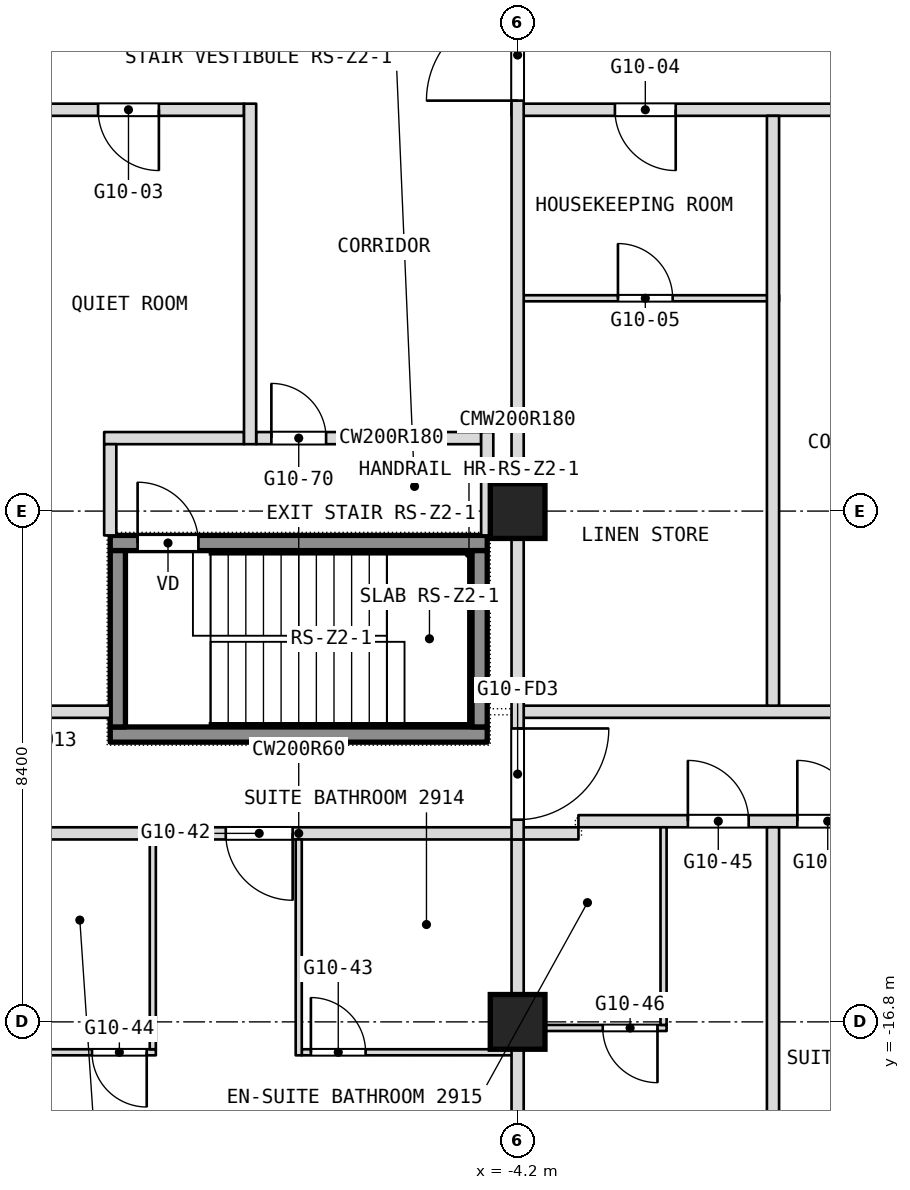
"""IFC4 building model, lengths in metres.
Left out: names, types, materials, properties, quantities, classifications, styles, units other than length and angle.
Written with IfcOpenShell. Run it as: python <this file> out.ifc"""

import sys

from ifc_helpers import new_model, si_unit, direction, frame, frame_2d, origin, origin_2d, place, context, subcontext, project, spatial, rectangle, extrude, element, fill, save


model = new_model("IFC4")
c1 = context("Model", 3, precision=1e-05, world=origin(), true_north=direction((0.0, 1.0)))
c2 = subcontext(c1, "Body", "Model", "MODEL_VIEW")
j1 = project(units=[si_unit("LENGTHUNIT", "METRE"), si_unit("PLANEANGLEUNIT", "RADIAN")], contexts=[c1])
p1 = place(None, origin())
s1 = spatial("IfcSite", under=j1, at=p1, CompositionType="ELEMENT")
p2 = place(p1, origin())
s2 = spatial("IfcBuilding", under=s1, at=p2, CompositionType="ELEMENT")
p3 = place(p2, frame((0.0, 0.0, 130.1)))
s3 = spatial("IfcBuildingStorey", under=s2, at=p3, CompositionType="ELEMENT", Elevation=130.1)
for number, where, z_axis, x_axis in (
    (1, (-4.2, -16.8, 0.0), (0.0, 0.0, 1.0), (1.0, 0.0, 0.0)),
    (2, (-4.2, -8.4, 0.0), (0.0, 0.0, 1.0), (1.0, 0.0, 0.0)),
):
    element("IfcColumn", number, at=place(p3, frame(where, z_axis=z_axis, x_axis=x_axis)), inside=s3, PredefinedType="COLUMN", context=c2, shape_type="SweptSolid", body=[
        extrude(rectangle(XDim=0.9, YDim=0.9, at=origin_2d()), origin(), (0.0, 0.0, 1.0), 3.6),
    ])
p4 = place(p3, frame((-12.5, -17.3, 0.0), z_axis=(0.0, 0.0, 1.0), x_axis=(1.0, 0.0, 0.0)))
e3 = element("IfcWall", 3, at=p4, inside=s3, PredefinedType="PARTITIONING", context=c2, shape_type="SweptSolid", body=[
    extrude(rectangle(XDim=2.35, YDim=0.1, at=frame_2d((1.175, 0.0))), origin(), (0.0, 0.0, 1.0), 3.34),
])
p5 = place(p4, frame((1.3, 0.0, 0.0)))
e4 = element("IfcOpeningElement", 4, at=p5, cuts=e3, PredefinedType="OPENING", context=c2, shape_type="SweptSolid", body=[
    extrude(rectangle(XDim=0.9, YDim=2.1, at=frame_2d((0.45, 1.05))), frame((0.0, 0.05, 0.0), z_axis=(0.0, -1.0, 0.0), x_axis=(1.0, 0.0, 0.0)), (0.0, 0.0, 1.0), 0.1),
])
p6 = place(p3, frame((-7.75, -17.3, 0.0), z_axis=(0.0, 0.0, 1.0), x_axis=(1.0, 0.0, 0.0)))
e5 = element("IfcWall", 5, at=p6, inside=s3, PredefinedType="PARTITIONING", context=c2, shape_type="SweptSolid", body=[
    extrude(rectangle(XDim=3.65, YDim=0.1, at=frame_2d((1.825, 0.0))), origin(), (0.0, 0.0, 1.0), 3.34),
])
p7 = place(p6, frame((0.15, 0.0, 0.0)))
e6 = element("IfcOpeningElement", 6, at=p7, cuts=e5, PredefinedType="OPENING", context=c2, shape_type="SweptSolid", body=[
    extrude(rectangle(XDim=0.9, YDim=2.1, at=frame_2d((0.45, 1.05))), frame((0.0, 0.05, 0.0), z_axis=(0.0, -1.0, 0.0), x_axis=(1.0, 0.0, 0.0)), (0.0, 0.0, 1.0), 0.1),
])
p8 = place(p3, frame((-4.1, -16.9, 0.0), z_axis=(0.0, 0.0, 1.0), x_axis=(1.0, 0.0, 0.0)))
e7 = element("IfcWall", 7, at=p8, inside=s3, PredefinedType="PARTITIONING", context=c2, shape_type="SweptSolid", body=[
    extrude(rectangle(XDim=2.35, YDim=0.1, at=frame_2d((1.175, 0.0))), origin(), (0.0, 0.0, 1.0), 2.89),
])
p9 = place(p8, frame((1.3, 0.0, 0.0)))
e8 = element("IfcOpeningElement", 8, at=p9, cuts=e7, PredefinedType="OPENING", context=c2, shape_type="SweptSolid", body=[
    extrude(rectangle(XDim=0.9, YDim=2.1, at=frame_2d((0.45, 1.05))), frame((0.0, 0.05, 0.0), z_axis=(0.0, -1.0, 0.0), x_axis=(1.0, 0.0, 0.0)), (0.0, 0.0, 1.0), 0.1),
])
p10 = place(p3, frame((-12.4, -13.7, 0.0), z_axis=(0.0, 0.0, 1.0), x_axis=(1.0, 0.0, 0.0)))
e9 = element("IfcWall", 9, at=p10, inside=s3, PredefinedType="PARTITIONING", context=c2, shape_type="SweptSolid", body=[
    extrude(rectangle(XDim=9.2, YDim=0.2, at=frame_2d((4.6, 0.0))), origin(), (0.0, 0.0, 1.0), 3.34),
])
p11 = place(p10, frame((3.4, 0.0, 0.0)))
e10 = element("IfcOpeningElement", 10, at=p11, cuts=e9, PredefinedType="OPENING", context=c2, shape_type="SweptSolid", body=[
    extrude(rectangle(XDim=1.1, YDim=2.1, at=frame_2d((0.55, 1.05))), frame((0.0, 0.1, 0.0), z_axis=(0.0, -1.0, 0.0), x_axis=(1.0, 0.0, 0.0)), (0.0, 0.0, 1.0), 0.2),
])
p12 = place(p3, frame((-3.2, -13.5, 0.0), z_axis=(0.0, 0.0, 1.0), x_axis=(1.0, 0.0, 0.0)))
e11 = element("IfcWall", 11, at=p12, inside=s3, PredefinedType="PARTITIONING", context=c2, shape_type="SweptSolid", body=[
    extrude(rectangle(XDim=19.9, YDim=0.2, at=frame_2d((9.95, 0.0))), origin(), (0.0, 0.0, 1.0), 3.34),
])
p13 = place(p12, frame((1.8, 0.0, 0.0)))
e12 = element("IfcOpeningElement", 12, at=p13, cuts=e11, PredefinedType="OPENING", context=c2, shape_type="SweptSolid", body=[
    extrude(rectangle(XDim=1.0, YDim=2.1, at=frame_2d((0.5, 1.05))), frame((0.0, 0.1, 0.0), z_axis=(0.0, -1.0, 0.0), x_axis=(1.0, 0.0, 0.0)), (0.0, 0.0, 1.0), 0.2),
])
p14 = place(p12, frame((3.6, 0.0, 0.0)))
e13 = element("IfcOpeningElement", 13, at=p14, cuts=e11, PredefinedType="OPENING", context=c2, shape_type="SweptSolid", body=[
    extrude(rectangle(XDim=1.0, YDim=2.1, at=frame_2d((0.5, 1.05))), frame((0.0, 0.1, 0.0), z_axis=(0.0, -1.0, 0.0), x_axis=(1.0, 0.0, 0.0)), (0.0, 0.0, 1.0), 0.2),
])
p15 = place(p12, frame((11.0, 0.0, 0.0)))
e14 = element("IfcOpeningElement", 14, at=p15, cuts=e11, PredefinedType="OPENING", context=c2, shape_type="SweptSolid", body=[
    extrude(rectangle(XDim=1.1, YDim=2.1, at=frame_2d((0.55, 1.05))), frame((0.0, 0.1, 0.0), z_axis=(0.0, -1.0, 0.0), x_axis=(1.0, 0.0, 0.0)), (0.0, 0.0, 1.0), 0.2),
])
p16 = place(p12, frame((18.6, 0.0, 0.0)))
e15 = element("IfcOpeningElement", 15, at=p16, cuts=e11, PredefinedType="OPENING", context=c2, shape_type="SweptSolid", body=[
    extrude(rectangle(XDim=1.0, YDim=2.1, at=frame_2d((0.5, 1.05))), frame((0.0, 0.1, 0.0), z_axis=(0.0, -1.0, 0.0), x_axis=(1.0, 0.0, 0.0)), (0.0, 0.0, 1.0), 0.2),
])
p17 = place(p3, frame((-16.7, -11.7, 0.0), z_axis=(0.0, 0.0, 1.0), x_axis=(1.0, 0.0, 0.0)))
e16 = element("IfcWall", 16, at=p17, inside=s3, PredefinedType="PARTITIONING", context=c2, shape_type="SweptSolid", body=[
    extrude(rectangle(XDim=5.8, YDim=0.2, at=frame_2d((2.9, 0.0))), origin(), (0.0, 0.0, 1.0), 3.34),
])
p18 = place(p3, frame((-4.1, -11.7, 0.0), z_axis=(0.0, 0.0, 1.0), x_axis=(1.0, 0.0, 0.0)))
e17 = element("IfcWall", 17, at=p18, inside=s3, PredefinedType="PARTITIONING", context=c2, shape_type="SweptSolid", body=[
    extrude(rectangle(XDim=20.8, YDim=0.2, at=frame_2d((10.4, 0.0))), origin(), (0.0, 0.0, 1.0), 3.34),
])
p19 = place(p18, frame((14.1, 0.0, 0.0)))
e18 = element("IfcOpeningElement", 18, at=p19, cuts=e17, PredefinedType="OPENING", context=c2, shape_type="SweptSolid", body=[
    extrude(rectangle(XDim=1.0, YDim=2.1, at=frame_2d((0.5, 1.05))), frame((0.0, 0.1, 0.0), z_axis=(0.0, -1.0, 0.0), x_axis=(1.0, 0.0, 0.0)), (0.0, 0.0, 1.0), 0.2),
])
p20 = place(p3, frame((-11.0, -7.2, 0.0), z_axis=(0.0, 0.0, 1.0), x_axis=(1.0, 0.0, 0.0)))
e19 = element("IfcWall", 19, at=p20, inside=s3, PredefinedType="PARTITIONING", context=c2, shape_type="SweptSolid", body=[
    extrude(rectangle(XDim=2.3, YDim=0.2, at=frame_2d((1.15, 0.0))), origin(), (0.0, 0.0, 1.0), 3.34),
])
p21 = place(p3, frame((-8.5, -7.2, 0.0), z_axis=(0.0, 0.0, 1.0), x_axis=(1.0, 0.0, 0.0)))
e20 = element("IfcWall", 20, at=p21, inside=s3, PredefinedType="PARTITIONING", context=c2, shape_type="SweptSolid", body=[
    extrude(rectangle(XDim=3.7, YDim=0.2, at=frame_2d((1.85, 0.0))), origin(), (0.0, 0.0, 1.0), 3.34),
])
p22 = place(p21, frame((0.25, 0.0, 0.0)))
e21 = element("IfcOpeningElement", 21, at=p22, cuts=e20, PredefinedType="OPENING", context=c2, shape_type="SweptSolid", body=[
    extrude(rectangle(XDim=0.9, YDim=2.1, at=frame_2d((0.45, 1.05))), frame((0.0, 0.1, 0.0), z_axis=(0.0, -1.0, 0.0), x_axis=(1.0, 0.0, 0.0)), (0.0, 0.0, 1.0), 0.2),
])
p23 = place(p3, frame((-4.1, -4.9, 0.0), z_axis=(0.0, 0.0, 1.0), x_axis=(1.0, 0.0, 0.0)))
e22 = element("IfcWall", 22, at=p23, inside=s3, PredefinedType="PARTITIONING", context=c2, shape_type="SweptSolid", body=[
    extrude(rectangle(XDim=4.2, YDim=0.1, at=frame_2d((2.1, 0.0))), origin(), (0.0, 0.0, 1.0), 3.34),
])
p24 = place(p23, frame((1.55, 0.0, 0.0)))
e23 = element("IfcOpeningElement", 23, at=p24, cuts=e22, PredefinedType="OPENING", context=c2, shape_type="SweptSolid", body=[
    extrude(rectangle(XDim=0.9, YDim=2.1, at=frame_2d((0.45, 1.05))), frame((0.0, 0.05, 0.0), z_axis=(0.0, -1.0, 0.0), x_axis=(1.0, 0.0, 0.0)), (0.0, 0.0, 1.0), 0.1),
])
p25 = place(p3, frame((-16.9, -1.8, 0.0), z_axis=(0.0, 0.0, 1.0), x_axis=(1.0, 0.0, 0.0)))
e24 = element("IfcWall", 24, at=p25, inside=s3, PredefinedType="PARTITIONING", context=c2, shape_type="SweptSolid", body=[
    extrude(rectangle(XDim=8.2, YDim=0.2, at=frame_2d((4.1, 0.0))), origin(), (0.0, 0.0, 1.0), 3.34),
])
p26 = place(p25, frame((1.7, 0.0, 0.0)))
e25 = element("IfcOpeningElement", 25, at=p26, cuts=e24, PredefinedType="OPENING", context=c2, shape_type="SweptSolid", body=[
    extrude(rectangle(XDim=1.0, YDim=2.1, at=frame_2d((0.5, 1.05))), frame((0.0, 0.1, 0.0), z_axis=(0.0, -1.0, 0.0), x_axis=(1.0, 0.0, 0.0)), (0.0, 0.0, 1.0), 0.2),
])
p27 = place(p25, frame((5.8, 0.0, 0.0)))
e26 = element("IfcOpeningElement", 26, at=p27, cuts=e24, PredefinedType="OPENING", context=c2, shape_type="SweptSolid", body=[
    extrude(rectangle(XDim=1.0, YDim=2.1, at=frame_2d((0.5, 1.05))), frame((0.0, 0.1, 0.0), z_axis=(0.0, -1.0, 0.0), x_axis=(1.0, 0.0, 0.0)), (0.0, 0.0, 1.0), 0.2),
])
p28 = place(p3, frame((-4.3, -1.8, 0.0), z_axis=(0.0, 0.0, 1.0), x_axis=(1.0, 0.0, 0.0)))
e27 = element("IfcWall", 27, at=p28, inside=s3, PredefinedType="PARTITIONING", context=c2, shape_type="SweptSolid", body=[
    extrude(rectangle(XDim=11.3, YDim=0.2, at=frame_2d((5.65, 0.0))), origin(), (0.0, 0.0, 1.0), 3.34),
])
p29 = place(p28, frame((1.7, 0.0, 0.0)))
e28 = element("IfcOpeningElement", 28, at=p29, cuts=e27, PredefinedType="OPENING", context=c2, shape_type="SweptSolid", body=[
    extrude(rectangle(XDim=1.0, YDim=2.1, at=frame_2d((0.5, 1.05))), frame((0.0, 0.1, 0.0), z_axis=(0.0, -1.0, 0.0), x_axis=(1.0, 0.0, 0.0)), (0.0, 0.0, 1.0), 0.2),
])
p30 = place(p28, frame((5.9, 0.0, 0.0)))
e29 = element("IfcOpeningElement", 29, at=p30, cuts=e27, PredefinedType="OPENING", context=c2, shape_type="SweptSolid", body=[
    extrude(rectangle(XDim=1.0, YDim=2.1, at=frame_2d((0.5, 1.05))), frame((0.0, 0.1, 0.0), z_axis=(0.0, -1.0, 0.0), x_axis=(1.0, 0.0, 0.0)), (0.0, 0.0, 1.0), 0.2),
])
p31 = place(p28, frame((10.1, 0.0, 0.0)))
e30 = element("IfcOpeningElement", 30, at=p31, cuts=e27, PredefinedType="OPENING", context=c2, shape_type="SweptSolid", body=[
    extrude(rectangle(XDim=1.0, YDim=2.1, at=frame_2d((0.5, 1.05))), frame((0.0, 0.1, 0.0), z_axis=(0.0, -1.0, 0.0), x_axis=(1.0, 0.0, 0.0)), (0.0, 0.0, 1.0), 0.2),
])
p32 = place(p3, frame((0.0, -23.3, 0.0), z_axis=(0.0, 0.0, 1.0), x_axis=(0.0, 1.0, 0.0)))
e31 = element("IfcWall", 31, at=p32, inside=s3, PredefinedType="PARTITIONING", context=c2, shape_type="SweptSolid", body=[
    extrude(rectangle(XDim=9.7, YDim=0.2, at=frame_2d((4.85, 0.0))), origin(), (0.0, 0.0, 1.0), 3.34),
])
p33 = place(p3, frame((0.0, -11.6, 0.0), z_axis=(0.0, 0.0, 1.0), x_axis=(0.0, 1.0, 0.0)))
e32 = element("IfcWall", 32, at=p33, inside=s3, PredefinedType="PARTITIONING", context=c2, shape_type="SweptSolid", body=[
    extrude(rectangle(XDim=9.7, YDim=0.2, at=frame_2d((4.85, 0.0))), origin(), (0.0, 0.0, 1.0), 3.34),
])
p34 = place(p3, frame((-1.8, -16.85, 0.0), z_axis=(0.0, 0.0, 1.0), x_axis=(0.0, 1.0, 0.0)))
e33 = element("IfcWall", 33, at=p34, inside=s3, PredefinedType="PARTITIONING", context=c2, shape_type="SweptSolid", body=[
    extrude(rectangle(XDim=3.25, YDim=0.1, at=frame_2d((1.625, 0.0))), origin(), (0.0, 0.0, 1.0), 3.34),
])
p35 = place(p3, frame((-4.2, -23.3, 0.0), z_axis=(0.0, 0.0, 1.0), x_axis=(0.0, 1.0, 0.0)))
e34 = element("IfcWall", 34, at=p35, inside=s3, PredefinedType="PARTITIONING", context=c2, shape_type="SweptSolid", body=[
    extrude(rectangle(XDim=9.5, YDim=0.2, at=frame_2d((4.75, 0.0))), origin(), (0.0, 0.0, 1.0), 3.34),
])
p36 = place(p3, frame((-4.2, -13.8, 0.0), z_axis=(0.0, 0.0, 1.0), x_axis=(0.0, 1.0, 0.0)))
e35 = element("IfcWall", 35, at=p36, inside=s3, PredefinedType="PARTITIONING", context=c2, shape_type="SweptSolid", body=[
    extrude(rectangle(XDim=13.8, YDim=0.2, at=frame_2d((6.9, 0.0))), origin(), (0.0, 0.0, 1.0), 3.34),
])
p37 = place(p36, frame((12.15, 0.0, 0.0)))
e36 = element("IfcOpeningElement", 36, at=p37, cuts=e35, PredefinedType="OPENING", context=c2, shape_type="SweptSolid", body=[
    extrude(rectangle(XDim=1.5, YDim=2.1, at=frame_2d((0.75, 1.05))), frame((0.0, 0.1, 0.0), z_axis=(0.0, -1.0, 0.0), x_axis=(1.0, 0.0, 0.0)), (0.0, 0.0, 1.0), 0.2),
])
p38 = place(p36, frame((0.325, 0.0, 0.0)))
e37 = element("IfcOpeningElement", 37, at=p38, cuts=e35, PredefinedType="OPENING", context=c2, shape_type="SweptSolid", body=[
    extrude(rectangle(XDim=1.5, YDim=2.1, at=frame_2d((0.75, 1.05))), frame((0.0, 0.1, 0.0), z_axis=(0.0, -1.0, 0.0), x_axis=(1.0, 0.0, 0.0)), (0.0, 0.0, 1.0), 0.2),
])
p39 = place(p3, frame((-4.7, -8.8, 0.0), z_axis=(0.0, 0.0, 1.0), x_axis=(0.0, 1.0, 0.0)))
e38 = element("IfcWall", 38, at=p39, inside=s3, PredefinedType="PARTITIONING", context=c2, shape_type="SweptSolid", body=[
    extrude(rectangle(XDim=1.7, YDim=0.2, at=frame_2d((0.85, 0.0))), origin(), (0.0, 0.0, 1.0), 3.34),
])
p40 = place(p3, frame((-7.8, -17.35, 0.0), z_axis=(0.0, 0.0, 1.0), x_axis=(0.0, 1.0, 0.0)))
e39 = element("IfcWall", 39, at=p40, inside=s3, PredefinedType="PARTITIONING", context=c2, shape_type="SweptSolid", body=[
    extrude(rectangle(XDim=3.55, YDim=0.1, at=frame_2d((1.775, 0.0))), origin(), (0.0, 0.0, 1.0), 3.34),
])
p41 = place(p3, frame((-8.6, -7.3, 0.0), z_axis=(0.0, 0.0, 1.0), x_axis=(0.0, 1.0, 0.0)))
e40 = element("IfcWall", 40, at=p41, inside=s3, PredefinedType="PARTITIONING", context=c2, shape_type="SweptSolid", body=[
    extrude(rectangle(XDim=5.6, YDim=0.2, at=frame_2d((2.8, 0.0))), origin(), (0.0, 0.0, 1.0), 3.34),
])
p42 = place(p3, frame((-10.2, -17.25, 0.0), z_axis=(0.0, 0.0, 1.0), x_axis=(0.0, 1.0, 0.0)))
e41 = element("IfcWall", 41, at=p42, inside=s3, PredefinedType="PARTITIONING", context=c2, shape_type="SweptSolid", body=[
    extrude(rectangle(XDim=3.45, YDim=0.1, at=frame_2d((1.725, 0.0))), origin(), (0.0, 0.0, 1.0), 3.34),
])
p43 = place(p3, frame((-10.9, -8.8, 0.0), z_axis=(0.0, 0.0, 1.0), x_axis=(0.0, 1.0, 0.0)))
e42 = element("IfcWall", 42, at=p43, inside=s3, PredefinedType="PARTITIONING", context=c2, shape_type="SweptSolid", body=[
    extrude(rectangle(XDim=1.5, YDim=0.2, at=frame_2d((0.75, 0.0))), origin(), (0.0, 0.0, 1.0), 3.34),
])
p44 = place(p3, frame((-10.9, -12.075, 0.1), z_axis=(0.0, 0.0, 1.0), x_axis=(1.0, 0.0, 0.0)))
e43 = element("IfcWall", 43, at=p44, inside=s3, PredefinedType="SHEAR", context=c2, shape_type="SweptSolid", body=[
    extrude(rectangle(XDim=6.2, YDim=0.25, at=frame_2d((3.1, 0.0))), origin(), (0.0, 0.0, 1.0), 3.6),
])
p45 = place(p3, frame((-10.9, -8.925, 0.1), z_axis=(0.0, 0.0, 1.0), x_axis=(1.0, 0.0, 0.0)))
e44 = element("IfcWall", 44, at=p45, inside=s3, PredefinedType="SHEAR", context=c2, shape_type="SweptSolid", body=[
    extrude(rectangle(XDim=6.2, YDim=0.25, at=frame_2d((3.1, 0.0))), origin(), (0.0, 0.0, 1.0), 3.6),
])
p46 = place(p45, frame((0.45, 0.0, 0.0)))
e45 = element("IfcOpeningElement", 45, at=p46, cuts=e44, PredefinedType="OPENING", context=c2, shape_type="SweptSolid", body=[
    extrude(rectangle(XDim=1.0, YDim=2.1, at=frame_2d((0.5, 1.05))), frame((0.0, 0.125, 0.0), z_axis=(0.0, -1.0, 0.0), x_axis=(1.0, 0.0, 0.0)), (0.0, 0.0, 1.0), 0.25),
])
for number, where, z_axis, x_axis in (
    (46, (-10.775, -11.95, 0.1), (0.0, 0.0, 1.0), (0.0, 1.0, 0.0)),
    (47, (-4.825, -11.95, 0.1), (0.0, 0.0, 1.0), (0.0, 1.0, 0.0)),
):
    element("IfcWall", number, at=place(p3, frame(where, z_axis=z_axis, x_axis=x_axis)), inside=s3, PredefinedType="SHEAR", context=c2, shape_type="SweptSolid", body=[
        extrude(rectangle(XDim=2.9, YDim=0.25, at=frame_2d((1.45, 0.0))), origin(), (0.0, 0.0, 1.0), 3.6),
    ])
p47 = place(p5, origin())
e48 = element("IfcDoor", 48, at=p47, inside=s3, OperationType="SINGLE_SWING_RIGHT", PredefinedType="DOOR", context=c2, shape_type="SweptSolid", body=[
    extrude(rectangle(XDim=0.9, YDim=2.1, at=frame_2d((0.45, 1.05))), frame((0.0, 0.025, 0.0), z_axis=(0.0, -1.0, 0.0), x_axis=(1.0, 0.0, 0.0)), (0.0, 0.0, 1.0), 0.05),
])
fill(e4, e48)
p48 = place(p7, origin())
e49 = element("IfcDoor", 49, at=p48, inside=s3, OperationType="SINGLE_SWING_LEFT", PredefinedType="DOOR", context=c2, shape_type="SweptSolid", body=[
    extrude(rectangle(XDim=0.9, YDim=2.1, at=frame_2d((0.45, 1.05))), frame((0.0, 0.025, 0.0), z_axis=(0.0, -1.0, 0.0), x_axis=(1.0, 0.0, 0.0)), (0.0, 0.0, 1.0), 0.05),
])
fill(e6, e49)
p49 = place(p9, origin())
e50 = element("IfcDoor", 50, at=p49, inside=s3, OperationType="SINGLE_SWING_RIGHT", PredefinedType="DOOR", context=c2, shape_type="SweptSolid", body=[
    extrude(rectangle(XDim=0.9, YDim=2.1, at=frame_2d((0.45, 1.05))), frame((0.0, 0.025, 0.0), z_axis=(0.0, -1.0, 0.0), x_axis=(1.0, 0.0, 0.0)), (0.0, 0.0, 1.0), 0.05),
])
fill(e8, e50)
p50 = place(p11, origin())
e51 = element("IfcDoor", 51, at=p50, inside=s3, OperationType="SINGLE_SWING_LEFT", PredefinedType="DOOR", context=c2, shape_type="SweptSolid", body=[
    extrude(rectangle(XDim=1.1, YDim=2.1, at=frame_2d((0.55, 1.05))), frame((0.0, 0.025, 0.0), z_axis=(0.0, -1.0, 0.0), x_axis=(1.0, 0.0, 0.0)), (0.0, 0.0, 1.0), 0.05),
])
fill(e10, e51)
p51 = place(p13, origin())
e52 = element("IfcDoor", 52, at=p51, inside=s3, OperationType="SINGLE_SWING_LEFT", PredefinedType="DOOR", context=c2, shape_type="SweptSolid", body=[
    extrude(rectangle(XDim=1.0, YDim=2.1, at=frame_2d((0.5, 1.05))), frame((0.0, 0.025, 0.0), z_axis=(0.0, -1.0, 0.0), x_axis=(1.0, 0.0, 0.0)), (0.0, 0.0, 1.0), 0.05),
])
fill(e12, e52)
p52 = place(p14, origin())
e53 = element("IfcDoor", 53, at=p52, inside=s3, OperationType="SINGLE_SWING_LEFT", PredefinedType="DOOR", context=c2, shape_type="SweptSolid", body=[
    extrude(rectangle(XDim=1.0, YDim=2.1, at=frame_2d((0.5, 1.05))), frame((0.0, 0.025, 0.0), z_axis=(0.0, -1.0, 0.0), x_axis=(1.0, 0.0, 0.0)), (0.0, 0.0, 1.0), 0.05),
])
fill(e13, e53)
p53 = place(p22, origin())
e54 = element("IfcDoor", 54, at=p53, inside=s3, OperationType="SINGLE_SWING_RIGHT", PredefinedType="DOOR", context=c2, shape_type="SweptSolid", body=[
    extrude(rectangle(XDim=0.9, YDim=2.1, at=frame_2d((0.45, 1.05))), frame((0.0, 0.025, 0.0), z_axis=(0.0, -1.0, 0.0), x_axis=(1.0, 0.0, 0.0)), (0.0, 0.0, 1.0), 0.05),
])
fill(e21, e54)
p54 = place(p24, origin())
e55 = element("IfcDoor", 55, at=p54, inside=s3, OperationType="SINGLE_SWING_LEFT", PredefinedType="DOOR", context=c2, shape_type="SweptSolid", body=[
    extrude(rectangle(XDim=0.9, YDim=2.1, at=frame_2d((0.45, 1.05))), frame((0.0, 0.025, 0.0), z_axis=(0.0, -1.0, 0.0), x_axis=(1.0, 0.0, 0.0)), (0.0, 0.0, 1.0), 0.05),
])
fill(e23, e55)
p55 = place(p27, origin())
e56 = element("IfcDoor", 56, at=p55, inside=s3, OperationType="SINGLE_SWING_LEFT", PredefinedType="DOOR", context=c2, shape_type="SweptSolid", body=[
    extrude(rectangle(XDim=1.0, YDim=2.1, at=frame_2d((0.5, 1.05))), frame((0.0, 0.025, 0.0), z_axis=(0.0, -1.0, 0.0), x_axis=(1.0, 0.0, 0.0)), (0.0, 0.0, 1.0), 0.05),
])
fill(e26, e56)
p56 = place(p29, origin())
e57 = element("IfcDoor", 57, at=p56, inside=s3, OperationType="SINGLE_SWING_RIGHT", PredefinedType="DOOR", context=c2, shape_type="SweptSolid", body=[
    extrude(rectangle(XDim=1.0, YDim=2.1, at=frame_2d((0.5, 1.05))), frame((0.0, 0.025, 0.0), z_axis=(0.0, -1.0, 0.0), x_axis=(1.0, 0.0, 0.0)), (0.0, 0.0, 1.0), 0.05),
])
fill(e28, e57)
p57 = place(p46, origin())
e58 = element("IfcDoor", 58, at=p57, inside=s3, OperationType="SINGLE_SWING_LEFT", PredefinedType="DOOR", context=c2, shape_type="SweptSolid", body=[
    extrude(rectangle(XDim=1.0, YDim=2.1, at=frame_2d((0.5, 1.05))), frame((0.0, 0.025, 0.0), z_axis=(0.0, -1.0, 0.0), x_axis=(1.0, 0.0, 0.0)), (0.0, 0.0, 1.0), 0.05),
])
fill(e45, e58)
p58 = place(p37, origin())
e59 = element("IfcDoor", 59, at=p58, inside=s3, OperationType="DOUBLE_DOOR_DOUBLE_SWING", PredefinedType="DOOR", context=c2, shape_type="SweptSolid", body=[
    extrude(rectangle(XDim=1.5, YDim=2.1, at=frame_2d((0.75, 1.05))), frame((0.0, 0.025, 0.0), z_axis=(0.0, -1.0, 0.0), x_axis=(1.0, 0.0, 0.0)), (0.0, 0.0, 1.0), 0.05),
])
fill(e36, e59)
p59 = place(p38, origin())
e60 = element("IfcDoor", 60, at=p59, inside=s3, OperationType="DOUBLE_DOOR_DOUBLE_SWING", PredefinedType="DOOR", context=c2, shape_type="SweptSolid", body=[
    extrude(rectangle(XDim=1.5, YDim=2.1, at=frame_2d((0.75, 1.05))), frame((0.0, 0.025, 0.0), z_axis=(0.0, -1.0, 0.0), x_axis=(1.0, 0.0, 0.0)), (0.0, 0.0, 1.0), 0.05),
])
fill(e37, e60)
save(model, sys.argv[1])
